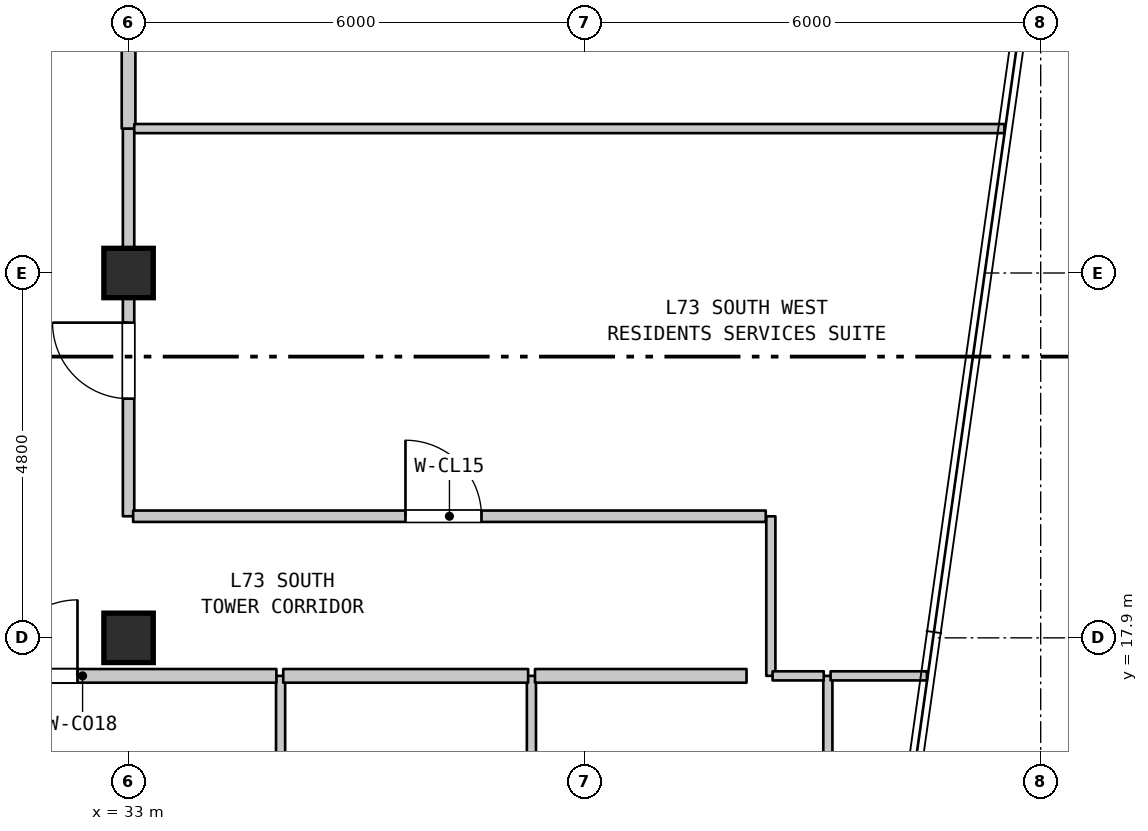
"""IFC4 building model, lengths in metres.
Left out: names, types, materials, properties, quantities, classifications, styles, units other than length and angle.
Written with IfcOpenShell. Run it as: python <this file> out.ifc"""

import sys

from ifc_helpers import new_model, si_unit, direction, frame, frame_2d, origin, origin_2d, place, context, subcontext, project, spatial, rectangle, extrude, element, fill, save


model = new_model("IFC4")
c1 = context("Model", 3, precision=1e-05, world=origin(), true_north=direction((0.0, 1.0)))
c2 = subcontext(c1, "Body", "Model", "MODEL_VIEW")
j1 = project(units=[si_unit("LENGTHUNIT", "METRE"), si_unit("PLANEANGLEUNIT", "RADIAN")], contexts=[c1])
p1 = place(None, origin())
s1 = spatial("IfcSite", under=j1, at=p1, CompositionType="ELEMENT")
p2 = place(p1, origin())
s2 = spatial("IfcBuilding", under=s1, at=p2, CompositionType="ELEMENT")
p3 = place(p2, frame((0.0, 0.0, 291.7)))
s3 = spatial("IfcBuildingStorey", under=s2, at=p3, CompositionType="ELEMENT", Elevation=291.7)
for number, where, z_axis, x_axis in (
    (1, (33.0, 17.9, 0.0), (0.0, 0.0, 1.0), (1.0, 0.0, 0.0)),
    (2, (33.0, 22.7, 0.0), (0.0, 0.0, 1.0), (1.0, 0.0, 0.0)),
):
    element("IfcColumn", number, at=place(p3, frame(where, z_axis=z_axis, x_axis=x_axis)), inside=s3, PredefinedType="COLUMN", context=c2, shape_type="SweptSolid", body=[
        extrude(rectangle(XDim=0.65, YDim=0.65, at=origin_2d()), origin(), (0.0, 0.0, 1.0), 3.7),
    ])
p4 = place(p3, frame((33.0, 19.5, 0.0), z_axis=(0.0, 0.0, 1.0), x_axis=(0.0, 1.0, 0.0)))
e3 = element("IfcWall", 3, at=p4, inside=s3, PredefinedType="STANDARD", context=c2, shape_type="SweptSolid", body=[
    extrude(rectangle(XDim=5.1, YDim=0.15, at=frame_2d((2.55, 0.0))), origin(), (0.0, 0.0, 1.0), 3.1),
])
p5 = place(p4, frame((1.547, 0.0, 0.0)))
e4 = element("IfcOpeningElement", 4, at=p5, cuts=e3, PredefinedType="OPENING", context=c2, shape_type="SweptSolid", body=[
    extrude(rectangle(XDim=1.0, YDim=2.15, at=frame_2d((0.5, 1.075))), frame((0.0, 0.085, 0.0), z_axis=(0.0, -1.0, 0.0), x_axis=(1.0, 0.0, 0.0)), (0.0, 0.0, 1.0), 0.17),
])
p6 = place(p3, frame((33.0, 24.6, 0.0), z_axis=(0.0, 0.0, 1.0), x_axis=(0.0, 1.0, 0.0)))
e5 = element("IfcWall", 5, at=p6, inside=s3, PredefinedType="STANDARD", context=c2, shape_type="SweptSolid", body=[
    extrude(rectangle(XDim=3.4, YDim=0.18, at=frame_2d((1.7, 0.0))), origin(), (0.0, 0.0, 1.0), 3.1),
])
p7 = place(p6, frame((1.127, 0.0, 0.0)))
e6 = element("IfcOpeningElement", 6, at=p7, cuts=e5, PredefinedType="OPENING", context=c2, shape_type="SweptSolid", body=[
    extrude(rectangle(XDim=1.0, YDim=2.15, at=frame_2d((0.5, 1.075))), frame((0.0, 0.1, 0.0), z_axis=(0.0, -1.0, 0.0), x_axis=(1.0, 0.0, 0.0)), (0.0, 0.0, 1.0), 0.2),
])
for number, where, z_axis, x_axis in (
    (7, (35.0, 13.62, 0.0), (0.0, 0.0, 1.0), (0.0, 1.0, 0.0)),
    (8, (38.3, 13.62, 0.0), (0.0, 0.0, 1.0), (0.0, 1.0, 0.0)),
):
    element("IfcWall", number, at=place(p3, frame(where, z_axis=z_axis, x_axis=x_axis)), inside=s3, PredefinedType="PARTITIONING", context=c2, shape_type="SweptSolid", body=[
        extrude(rectangle(XDim=3.78, YDim=0.12, at=frame_2d((1.89, 0.0))), origin(), (0.0, 0.0, 1.0), 3.39),
    ])
p8 = place(p3, frame((41.45, 17.4, 0.0), z_axis=(0.0, 0.0, 1.0), x_axis=(0.0, 1.0, 0.0)))
e9 = element("IfcWall", 9, at=p8, inside=s3, PredefinedType="PARTITIONING", context=c2, shape_type="SweptSolid", body=[
    extrude(rectangle(XDim=2.099, YDim=0.12, at=frame_2d((1.05, 0.0))), origin(), (0.0, 0.0, 1.0), 3.39),
])
p9 = place(p3, frame((42.2, 13.62, 0.0), z_axis=(0.0, 0.0, 1.0), x_axis=(0.0, 1.0, 0.0)))
e10 = element("IfcWall", 10, at=p9, inside=s3, PredefinedType="PARTITIONING", context=c2, shape_type="SweptSolid", body=[
    extrude(rectangle(XDim=3.78, YDim=0.12, at=frame_2d((1.89, 0.0))), origin(), (0.0, 0.0, 1.0), 3.39),
])
p10 = place(p3, frame((29.845, 17.4, 0.0), z_axis=(0.0, 0.0, 1.0), x_axis=(1.0, 0.0, 0.0)))
e11 = element("IfcWall", 11, at=p10, inside=s3, PredefinedType="STANDARD", context=c2, shape_type="SweptSolid", body=[
    extrude(rectangle(XDim=5.1, YDim=0.18, at=frame_2d((2.55, 0.0))), origin(), (0.0, 0.0, 1.0), 3.39),
])
p11 = place(p10, frame((1.483, 0.0, 0.0)))
e12 = element("IfcOpeningElement", 12, at=p11, cuts=e11, PredefinedType="OPENING", context=c2, shape_type="SweptSolid", body=[
    extrude(rectangle(XDim=1.0, YDim=2.15, at=frame_2d((0.5, 1.075))), frame((0.0, 0.1, 0.0), z_axis=(0.0, -1.0, 0.0), x_axis=(1.0, 0.0, 0.0)), (0.0, 0.0, 1.0), 0.2),
])
p12 = place(p3, frame((35.035, 17.4, 0.0), z_axis=(0.0, 0.0, 1.0), x_axis=(1.0, 0.0, 0.0)))
e13 = element("IfcWall", 13, at=p12, inside=s3, PredefinedType="STANDARD", context=c2, shape_type="SweptSolid", body=[
    extrude(rectangle(XDim=3.222, YDim=0.18, at=frame_2d((1.611, 0.0))), origin(), (0.0, 0.0, 1.0), 3.39),
])
p13 = place(p3, frame((38.347, 17.4, 0.0), z_axis=(0.0, 0.0, 1.0), x_axis=(1.0, 0.0, 0.0)))
e14 = element("IfcWall", 14, at=p13, inside=s3, PredefinedType="STANDARD", context=c2, shape_type="SweptSolid", body=[
    extrude(rectangle(XDim=2.783, YDim=0.18, at=frame_2d((1.392, 0.0))), origin(), (0.0, 0.0, 1.0), 3.39),
])
p14 = place(p3, frame((41.473, 17.4, 0.0), z_axis=(0.0, 0.0, 1.0), x_axis=(1.0, 0.0, 0.0)))
e15 = element("IfcWall", 15, at=p14, inside=s3, PredefinedType="PARTITIONING", context=c2, shape_type="SweptSolid", body=[
    extrude(rectangle(XDim=0.673, YDim=0.12, at=frame_2d((0.336, 0.0))), origin(), (0.0, 0.0, 1.0), 3.39),
])
p15 = place(p3, frame((42.236, 17.4, 0.0), z_axis=(0.0, 0.0, 1.0), x_axis=(1.0, 0.0, 0.0)))
e16 = element("IfcWall", 16, at=p15, inside=s3, PredefinedType="PARTITIONING", context=c2, shape_type="SweptSolid", body=[
    extrude(rectangle(XDim=1.268, YDim=0.12, at=frame_2d((0.634, 0.0))), origin(), (0.0, 0.0, 1.0), 3.39),
])
p16 = place(p3, frame((33.06, 19.5, 0.0), z_axis=(0.0, 0.0, 1.0), x_axis=(1.0, 0.0, 0.0)))
e17 = element("IfcWall", 17, at=p16, inside=s3, PredefinedType="STANDARD", context=c2, shape_type="SweptSolid", body=[
    extrude(rectangle(XDim=8.323, YDim=0.15, at=frame_2d((4.162, 0.0))), origin(), (0.0, 0.0, 1.0), 3.39),
])
p17 = place(p16, frame((3.583, 0.0, 0.0)))
e18 = element("IfcOpeningElement", 18, at=p17, cuts=e17, PredefinedType="OPENING", context=c2, shape_type="SweptSolid", body=[
    extrude(rectangle(XDim=1.0, YDim=2.15, at=frame_2d((0.5, 1.075))), frame((0.0, 0.085, 0.0), z_axis=(0.0, -1.0, 0.0), x_axis=(1.0, 0.0, 0.0)), (0.0, 0.0, 1.0), 0.17),
])
p18 = place(p3, frame((33.075, 24.6, 0.0), z_axis=(0.0, 0.0, 1.0), x_axis=(1.0, 0.0, 0.0)))
e19 = element("IfcWall", 19, at=p18, inside=s3, PredefinedType="PARTITIONING", context=c2, shape_type="SweptSolid", body=[
    extrude(rectangle(XDim=11.448, YDim=0.12, at=frame_2d((5.724, 0.0))), origin(), (0.0, 0.0, 1.0), 3.39),
])
p19 = place(p5, origin())
e20 = element("IfcDoor", 20, at=p19, inside=s3, OperationType="SINGLE_SWING_RIGHT", PredefinedType="DOOR", context=c2, shape_type="SweptSolid", body=[
    extrude(rectangle(XDim=1.0, YDim=2.15, at=frame_2d((0.5, 1.075))), frame((0.0, 0.025, 0.0), z_axis=(0.0, -1.0, 0.0), x_axis=(1.0, 0.0, 0.0)), (0.0, 0.0, 1.0), 0.05),
])
fill(e4, e20)
p20 = place(p11, origin())
e21 = element("IfcDoor", 21, at=p20, inside=s3, OperationType="SINGLE_SWING_RIGHT", PredefinedType="DOOR", context=c2, shape_type="SweptSolid", body=[
    extrude(rectangle(XDim=1.0, YDim=2.15, at=frame_2d((0.5, 1.075))), frame((0.0, 0.025, 0.0), z_axis=(0.0, -1.0, 0.0), x_axis=(1.0, 0.0, 0.0)), (0.0, 0.0, 1.0), 0.05),
])
fill(e12, e21)
p21 = place(p17, origin())
e22 = element("IfcDoor", 22, at=p21, inside=s3, OperationType="SINGLE_SWING_LEFT", PredefinedType="DOOR", context=c2, shape_type="SweptSolid", body=[
    extrude(rectangle(XDim=1.0, YDim=2.15, at=frame_2d((0.5, 1.075))), frame((0.0, 0.025, 0.0), z_axis=(0.0, -1.0, 0.0), x_axis=(1.0, 0.0, 0.0)), (0.0, 0.0, 1.0), 0.05),
])
fill(e18, e22)
save(model, sys.argv[1])
